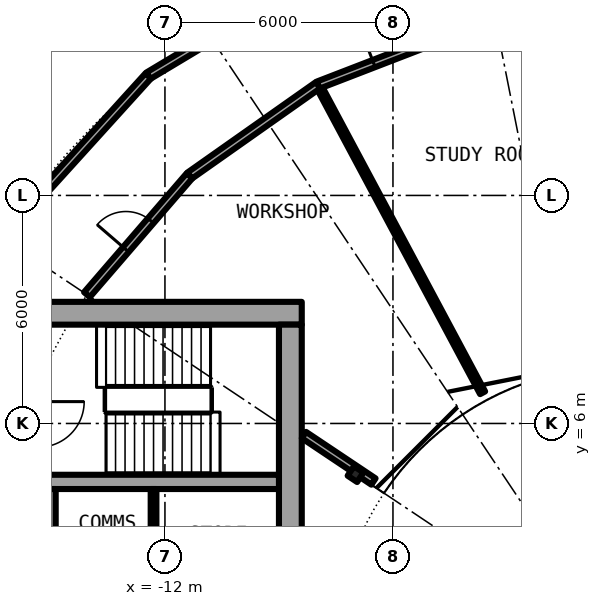
"""IFC4 building model, lengths in metres.
Left out: names, types, materials, properties, quantities, classifications, styles, units other than length and angle.
Written with IfcOpenShell. Run it as: python <this file> out.ifc"""

import sys

from ifc_helpers import new_model, si_unit, direction, frame, frame_2d, origin, origin_2d, place, context, subcontext, project, spatial, rectangle, i_section, extrude, element, fill, save


model = new_model("IFC4")
c1 = context("Model", 3, precision=1e-05, world=origin(), true_north=direction((0.0, 1.0)))
c2 = subcontext(c1, "Body", "Model", "MODEL_VIEW")
j1 = project(units=[si_unit("LENGTHUNIT", "METRE"), si_unit("PLANEANGLEUNIT", "RADIAN")], contexts=[c1])
p1 = place(None, origin())
s1 = spatial("IfcSite", under=j1, at=p1, CompositionType="ELEMENT")
p2 = place(p1, origin())
s2 = spatial("IfcBuilding", under=s1, at=p2, CompositionType="ELEMENT")
p3 = place(p2, frame((0.0, 0.0, 107.45)))
s3 = spatial("IfcBuildingStorey", under=s2, at=p3, CompositionType="ELEMENT", Elevation=107.45)
p4 = place(p3, frame((-6.984, 4.667, 0.0), z_axis=(0.0, 0.0, 1.0), x_axis=(-0.831469612303, 0.55557023302, 0.0)))
e1 = element("IfcColumn", 1, at=p4, inside=s3, PredefinedType="COLUMN", context=c2, shape_type="SweptSolid", body=[
    extrude(i_section(OverallWidth=0.3, OverallDepth=0.3, WebThickness=0.011, FlangeThickness=0.019, FilletRadius=0.027, at=origin_2d()), origin(), (0.0, 0.0, 1.0), 4.2),
])
p5 = place(p3, frame((-8.4, 8.9, 0.0), z_axis=(0.0, 0.0, 1.0), x_axis=(-1.0, 0.0, 0.0)))
e2 = element("IfcWall", 2, at=p5, inside=s3, PredefinedType="SHEAR", context=c2, shape_type="SweptSolid", body=[
    extrude(rectangle(XDim=13.8, YDim=0.6, at=frame_2d((6.9, 0.0))), origin(), (0.0, 0.0, 1.0), 4.2),
])
p6 = place(p5, frame((11.475, 0.0, 0.0)))
e3 = element("IfcOpeningElement", 3, at=p6, cuts=e2, PredefinedType="OPENING", context=c2, shape_type="SweptSolid", body=[
    extrude(rectangle(XDim=1.2, YDim=2.3, at=frame_2d((0.6, 1.15))), frame((0.0, 0.31, 0.0), z_axis=(0.0, -1.0, 0.0), x_axis=(1.0, 0.0, 0.0)), (0.0, 0.0, 1.0), 0.62),
])
p7 = place(p3, frame((-8.7, 8.6, 0.0), z_axis=(0.0, 0.0, 1.0), x_axis=(0.0, -1.0, 0.0)))
e4 = element("IfcWall", 4, at=p7, inside=s3, PredefinedType="SHEAR", context=c2, shape_type="SweptSolid", body=[
    extrude(rectangle(XDim=17.2, YDim=0.6, at=frame_2d((8.6, 0.0))), origin(), (0.0, 0.0, 1.0), 4.2),
])
p8 = place(p7, frame((7.4, 0.0, 0.1)))
e5 = element("IfcOpeningElement", 5, at=p8, cuts=e4, PredefinedType="OPENING", context=c2, shape_type="SweptSolid", body=[
    extrude(rectangle(XDim=2.4, YDim=2.2, at=frame_2d((1.2, 1.1))), frame((0.0, 0.31, 0.0), z_axis=(0.0, -1.0, 0.0), x_axis=(1.0, 0.0, 0.0)), (0.0, 0.0, 1.0), 0.62),
])
p9 = place(p3, frame((-9.0, 4.462, 0.0), z_axis=(0.0, 0.0, 1.0), x_axis=(-1.0, 0.0, 0.0)))
e6 = element("IfcWall", 6, at=p9, inside=s3, PredefinedType="SHEAR", context=c2, shape_type="SweptSolid", body=[
    extrude(rectangle(XDim=10.15, YDim=0.375, at=frame_2d((5.075, 0.0))), origin(), (0.0, 0.0, 1.0), 4.2),
])
p10 = place(p3, frame((-15.0, 1.825, 0.0), z_axis=(0.0, 0.0, 1.0), x_axis=(0.0, 1.0, 0.0)))
e7 = element("IfcWall", 7, at=p10, inside=s3, PredefinedType="SOLIDWALL", context=c2, shape_type="SweptSolid", body=[
    extrude(rectangle(XDim=2.45, YDim=0.25, at=frame_2d((1.225, 0.0))), origin(), (0.0, 0.0, 1.0), 3.85),
])
p11 = place(p3, frame((-12.3, 1.825, 0.0), z_axis=(0.0, 0.0, 1.0), x_axis=(0.0, 1.0, 0.0)))
e8 = element("IfcWall", 8, at=p11, inside=s3, PredefinedType="PARTITIONING", context=c2, shape_type="SweptSolid", body=[
    extrude(rectangle(XDim=2.45, YDim=0.15, at=frame_2d((1.225, 0.0))), origin(), (0.0, 0.0, 1.0), 3.85),
])
p12 = place(p3, frame((-7.969, 14.903, 0.0), z_axis=(0.0, 0.0, 1.0), x_axis=(0.471428625665, -0.881904218667, 0.0)))
e9 = element("IfcWall", 9, at=p12, inside=s3, PredefinedType="PARTITIONING", context=c2, shape_type="SweptSolid", body=[
    extrude(rectangle(XDim=9.18, YDim=0.15, at=frame_2d((4.59, 0.0))), origin(), (0.0, 0.0, 1.0), 3.85),
])
p13 = place(p3, frame((-6.513, 4.472, 0.0), z_axis=(0.0, 0.0, 1.0), x_axis=(-0.831333375071, 0.555774072347, 0.0)))
e10 = element("IfcWall", 10, at=p13, inside=s3, PredefinedType="PARTITIONING", context=c2, shape_type="SweptSolid", body=[
    extrude(rectangle(XDim=2.203, YDim=0.2, at=frame_2d((1.101, 0.0))), origin(), (0.0, 0.0, 1.0), 3.85),
])
p14 = place(p3, frame((-14.052, 9.389, 0.0), z_axis=(0.0, 0.0, 1.0), x_axis=(0.653212695939, 0.757174467256, 0.0)))
e11 = element("IfcWall", 11, at=p14, inside=s3, PredefinedType="PARTITIONING", context=c2, shape_type="SweptSolid", body=[
    extrude(rectangle(XDim=4.138, YDim=0.2, at=frame_2d((2.069, 0.0))), origin(), (0.0, 0.0, 1.0), 3.85),
])
p15 = place(p14, frame((1.569, 0.0, 0.0)))
e12 = element("IfcOpeningElement", 12, at=p15, cuts=e11, PredefinedType="OPENING", context=c2, shape_type="SweptSolid", body=[
    extrude(rectangle(XDim=1.0, YDim=2.3, at=frame_2d((0.5, 1.15))), frame((0.0, 0.11, 0.0), z_axis=(0.0, -1.0, 0.0), x_axis=(1.0, 0.0, 0.0)), (0.0, 0.0, 1.0), 0.22),
])
p16 = place(p3, frame((-11.349, 12.522, 0.0), z_axis=(0.0, 0.0, 1.0), x_axis=(0.817567680547, 0.575832517079, 0.0)))
e13 = element("IfcWall", 13, at=p16, inside=s3, PredefinedType="PARTITIONING", context=c2, shape_type="SweptSolid", body=[
    extrude(rectangle(XDim=4.137, YDim=0.2, at=frame_2d((2.068, 0.0))), origin(), (0.0, 0.0, 1.0), 3.85),
])
p17 = place(p3, frame((-7.967, 14.904, 0.0), z_axis=(0.0, 0.0, 1.0), x_axis=(0.932943640288, 0.360022449363, 0.0)))
e14 = element("IfcWall", 14, at=p17, inside=s3, PredefinedType="PARTITIONING", context=c2, shape_type="SweptSolid", body=[
    extrude(rectangle(XDim=4.139, YDim=0.2, at=frame_2d((2.069, 0.0))), origin(), (0.0, 0.0, 1.0), 3.85),
])
p18 = place(p17, frame((1.569, 0.0, 0.0)))
e15 = element("IfcOpeningElement", 15, at=p18, cuts=e14, PredefinedType="OPENING", context=c2, shape_type="SweptSolid", body=[
    extrude(rectangle(XDim=1.0, YDim=2.3, at=frame_2d((0.5, 1.15))), frame((0.0, 0.11, 0.0), z_axis=(0.0, -1.0, 0.0), x_axis=(1.0, 0.0, 0.0)), (0.0, 0.0, 1.0), 0.22),
])
p19 = place(p3, frame((-16.192, 11.004, 0.0), z_axis=(0.0, 0.0, 1.0), x_axis=(0.671481997275, 0.741020868354, 0.0)))
e16 = element("IfcWall", 16, at=p19, inside=s3, PredefinedType="PARTITIONING", context=c2, shape_type="SweptSolid", body=[
    extrude(rectangle(XDim=5.596, YDim=0.2, at=frame_2d((2.798, 0.0))), origin(), (0.0, 0.0, 1.0), 3.54),
])
p20 = place(p3, frame((-12.434, 15.151, 0.0), z_axis=(0.0, 0.0, 1.0), x_axis=(0.857663265693, 0.514211748875, 0.0)))
e17 = element("IfcWall", 17, at=p20, inside=s3, PredefinedType="PARTITIONING", context=c2, shape_type="SweptSolid", body=[
    extrude(rectangle(XDim=1.77, YDim=0.2, at=frame_2d((0.885, 0.0))), origin(), (0.0, 0.0, 1.0), 3.54),
])
p21 = place(p18, origin())
e18 = element("IfcDoor", 18, at=p21, inside=s3, OperationType="SINGLE_SWING_RIGHT", PredefinedType="DOOR", context=c2, shape_type="SweptSolid", body=[
    extrude(rectangle(XDim=1.0, YDim=2.3, at=frame_2d((0.5, 1.15))), frame((0.0, 0.025, 0.0), z_axis=(0.0, -1.0, 0.0), x_axis=(1.0, 0.0, 0.0)), (0.0, 0.0, 1.0), 0.05),
])
fill(e15, e18)
p22 = place(p15, origin())
e19 = element("IfcDoor", 19, at=p22, inside=s3, OperationType="SINGLE_SWING_RIGHT", PredefinedType="DOOR", context=c2, shape_type="SweptSolid", body=[
    extrude(rectangle(XDim=1.0, YDim=2.3, at=frame_2d((0.5, 1.15))), frame((0.0, 0.025, 0.0), z_axis=(0.0, -1.0, 0.0), x_axis=(1.0, 0.0, 0.0)), (0.0, 0.0, 1.0), 0.05),
])
fill(e12, e19)
save(model, sys.argv[1])
